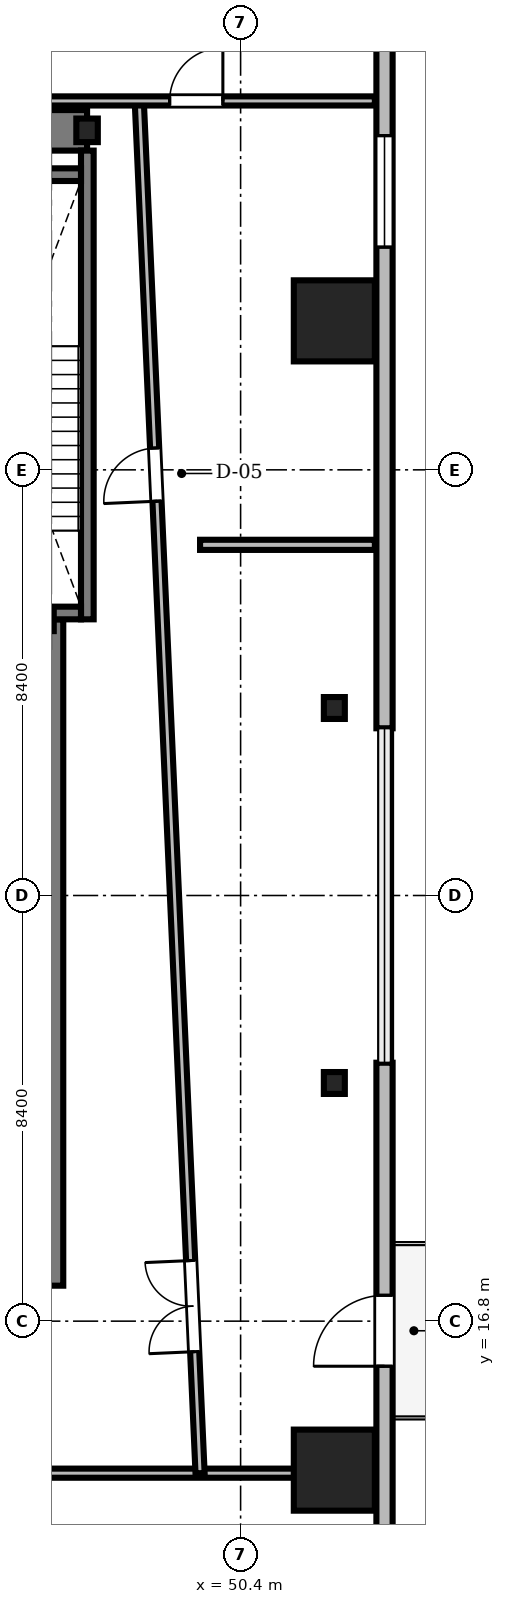
"""IFC4 building model, lengths in metres.
Left out: names, types, materials, properties, quantities, classifications, styles, units other than length and angle.
Written with IfcOpenShell. Run it as: python <this file> out.ifc"""

import sys

from ifc_helpers import new_model, si_unit, direction, frame, frame_2d, origin, origin_2d, place, context, subcontext, project, spatial, rectangle, i_section, extrude, source, transform, mapped, element, fill, save


model = new_model("IFC4")
c1 = context("Model", 3, precision=1e-05, world=origin(), true_north=direction((0.0, 1.0)))
c2 = subcontext(c1, "Body", "Model", "MODEL_VIEW")
j1 = project(units=[si_unit("LENGTHUNIT", "METRE"), si_unit("PLANEANGLEUNIT", "RADIAN")], contexts=[c1])
p1 = place(None, origin())
s1 = spatial("IfcSite", under=j1, at=p1, CompositionType="ELEMENT")
p2 = place(p1, origin())
s2 = spatial("IfcBuilding", under=s1, at=p2, CompositionType="ELEMENT")
p3 = place(p2, frame((0.0, 0.0, 98.7)))
s3 = spatial("IfcBuildingStorey", under=s2, at=p3, CompositionType="ELEMENT", Elevation=98.7)
m1 = source(origin(), c2, "Body", "SweptSolid", [
    extrude(rectangle(XDim=17.52, YDim=0.8, at=frame_2d((8.76, 0.0))), origin(), (0.0, 0.0, 1.0), 4.76),
])
p4 = place(p3, frame((29.85, 40.3, 0.0), z_axis=(0.0, 0.0, 1.0), x_axis=(1.0, 0.0, 0.0)))
e1 = element("IfcWall", 1, at=p4, inside=s3, PredefinedType="SHEAR", context=c2, shape_type="MappedRepresentation", body=[
    mapped(m1, transform((0.0, 0.0, 0.0), scale=1.0)),
])
m2 = source(origin(), c2, "Body", "SweptSolid", [
    extrude(rectangle(XDim=13.15, YDim=0.8, at=frame_2d((6.575, 0.0))), origin(), (0.0, 0.0, 1.0), 4.76),
])
p5 = place(p3, frame((46.5, 17.5, 0.0), z_axis=(0.0, 0.0, 1.0), x_axis=(0.0, 1.0, 0.0)))
e2 = element("IfcWall", 2, at=p5, inside=s3, PredefinedType="SHEAR", context=c2, shape_type="MappedRepresentation", body=[
    mapped(m2, transform((0.0, 0.0, 0.0), scale=1.0)),
])
m3 = source(origin(), c2, "Body", "SweptSolid", [
    extrude(i_section(OverallWidth=0.424, OverallDepth=0.465, WebThickness=0.035, FlangeThickness=0.056, FilletRadius=0.015, at=origin_2d()), origin(), (0.0, 0.0, 1.0), 4.76),
])
for number, where, z_axis, x_axis in (
    (3, (46.5, 30.65, 0.0), (0.0, 0.0, 1.0), (1.0, 0.0, 0.0)),
    (4, (47.37, 40.3, 0.0), (0.0, 0.0, 1.0), (1.0, 0.0, 0.0)),
):
    element("IfcColumn", number, at=place(p3, frame(where, z_axis=z_axis, x_axis=x_axis)), inside=s3, PredefinedType="COLUMN", context=c2, shape_type="MappedRepresentation", body=[
        mapped(m3, transform((0.0, 0.0, 0.0), scale=1.0)),
    ])
m4 = source(origin(), c2, "Body", "SweptSolid", [
    extrude(rectangle(XDim=1.6, YDim=1.6, at=origin_2d()), origin(), (0.0, 0.0, 1.0), 4.76),
])
for number, where, z_axis, x_axis in (
    (5, (52.25, 13.86, 0.0), (0.0, 0.0, 1.0), (1.0, 0.0, 0.0)),
    (6, (52.25, 36.54, 0.0), (0.0, 0.0, 1.0), (1.0, 0.0, 0.0)),
):
    element("IfcColumn", number, at=place(p3, frame(where, z_axis=z_axis, x_axis=x_axis)), inside=s3, PredefinedType="COLUMN", context=c2, shape_type="MappedRepresentation", body=[
        mapped(m4, transform((0.0, 0.0, 0.0), scale=1.0)),
    ])
m5 = source(origin(), c2, "Body", "SweptSolid", [
    extrude(i_section(OverallWidth=0.414, OverallDepth=0.432, WebThickness=0.026, FlangeThickness=0.04, FilletRadius=0.015, at=origin_2d()), origin(), (0.0, 0.0, 1.0), 4.76),
])
for number, where, z_axis, x_axis in (
    (7, (52.25, 21.5, 0.0), (0.0, 0.0, 1.0), (1.0, 0.0, 0.0)),
    (8, (52.25, 28.9, 0.0), (0.0, 0.0, 1.0), (1.0, 0.0, 0.0)),
):
    element("IfcColumn", number, at=place(p3, frame(where, z_axis=z_axis, x_axis=x_axis)), inside=s3, PredefinedType="COLUMN", context=c2, shape_type="MappedRepresentation", body=[
        mapped(m5, transform((0.0, 0.0, 0.0), scale=1.0)),
    ])
m6 = source(origin(), c2, "Body", "SweptSolid", [
    extrude(rectangle(XDim=15.6, YDim=0.32, at=frame_2d((7.8, 0.0))), origin(), (0.0, 0.0, 1.0), 4.76),
])
p6 = place(p3, frame((53.24, 6.3, 0.0), z_axis=(0.0, 0.0, 1.0), x_axis=(0.0, 1.0, 0.0)))
e9 = element("IfcWall", 9, at=p6, inside=s3, PredefinedType="SOLIDWALL", context=c2, shape_type="MappedRepresentation", body=[
    mapped(m6, transform((0.0, 0.0, 0.0), scale=1.0)),
])
m7 = source(origin(), c2, "Body", "SweptSolid", [
    extrude(rectangle(XDim=1.4, YDim=2.3, at=frame_2d((0.7, 1.15))), frame((0.0, 0.17, 0.0), z_axis=(0.0, -1.0, 0.0), x_axis=(1.0, 0.0, 0.0)), (0.0, 0.0, 1.0), 0.34),
])
p7 = place(p6, frame((9.61, 0.0, 0.0)))
e10 = element("IfcOpeningElement", 10, at=p7, cuts=e9, PredefinedType="OPENING", context=c2, shape_type="MappedRepresentation", body=[
    mapped(m7, transform((0.0, 0.0, 0.0), scale=1.0)),
])
m8 = source(origin(), c2, "Body", "SweptSolid", [
    extrude(rectangle(XDim=2.2, YDim=2.4, at=frame_2d((1.1, 1.2))), frame((0.0, 0.17, 0.0), z_axis=(0.0, -1.0, 0.0), x_axis=(1.0, 0.0, 0.0)), (0.0, 0.0, 1.0), 0.34),
])
p8 = place(p6, frame((3.005, 0.0, 0.72)))
e11 = element("IfcOpeningElement", 11, at=p8, cuts=e9, PredefinedType="OPENING", context=c2, shape_type="MappedRepresentation", body=[
    mapped(m8, transform((0.0, 0.0, 0.0), scale=1.0)),
])
m9 = source(origin(), c2, "Body", "SweptSolid", [
    extrude(rectangle(XDim=15.6, YDim=0.32, at=frame_2d((7.8, 0.0))), origin(), (0.0, 0.0, 1.0), 4.76),
])
p9 = place(p3, frame((53.24, 28.5, 0.0), z_axis=(0.0, 0.0, 1.0), x_axis=(0.0, 1.0, 0.0)))
e12 = element("IfcWall", 12, at=p9, inside=s3, PredefinedType="SOLIDWALL", context=c2, shape_type="MappedRepresentation", body=[
    mapped(m9, transform((0.0, 0.0, 0.0), scale=1.0)),
])
p10 = place(p9, frame((9.495, 0.0, 0.72)))
e13 = element("IfcOpeningElement", 13, at=p10, cuts=e12, PredefinedType="OPENING", context=c2, shape_type="MappedRepresentation", body=[
    mapped(m8, transform((0.0, 0.0, 0.0), scale=1.0)),
])
m10 = source(origin(), c2, "Body", "SweptSolid", [
    extrude(rectangle(XDim=9.25, YDim=0.25, at=frame_2d((4.625, 0.0))), origin(), (0.0, 0.0, 1.0), 4.8),
])
p11 = place(p3, frame((47.375, 30.65, 0.0), z_axis=(0.0, 0.0, 1.0), x_axis=(0.0, 1.0, 0.0)))
e14 = element("IfcWall", 14, at=p11, inside=s3, PredefinedType="SOLIDWALL", context=c2, shape_type="MappedRepresentation", body=[
    mapped(m10, transform((0.0, 0.0, 0.0), scale=1.0)),
])
m11 = source(origin(), c2, "Body", "SweptSolid", [
    extrude(rectangle(XDim=3.15, YDim=0.25, at=frame_2d((1.575, 0.0))), origin(), (0.0, 0.0, 1.0), 4.8),
])
p12 = place(p3, frame((44.1, 39.425, 0.0), z_axis=(0.0, 0.0, 1.0), x_axis=(1.0, 0.0, 0.0)))
e15 = element("IfcWall", 15, at=p12, inside=s3, PredefinedType="SOLIDWALL", context=c2, shape_type="MappedRepresentation", body=[
    mapped(m11, transform((0.0, 0.0, 0.0), scale=1.0)),
])
p13 = place(p3, frame((44.1, 30.775, 0.0), z_axis=(0.0, 0.0, 1.0), x_axis=(1.0, 0.0, 0.0)))
e16 = element("IfcWall", 16, at=p13, inside=s3, PredefinedType="SOLIDWALL", context=c2, shape_type="MappedRepresentation", body=[
    mapped(m11, transform((0.0, 0.0, 0.0), scale=1.0)),
])
m12 = source(origin(), c2, "Body", "SweptSolid", [
    extrude(rectangle(XDim=1.1, YDim=2.2, at=frame_2d((0.55, 1.1))), frame((0.0, 0.135, 0.0), z_axis=(0.0, -1.0, 0.0), x_axis=(1.0, 0.0, 0.0)), (0.0, 0.0, 1.0), 0.27),
])
p14 = place(p13, frame((0.35, 0.0, 0.0)))
e17 = element("IfcOpeningElement", 17, at=p14, cuts=e16, PredefinedType="OPENING", context=c2, shape_type="MappedRepresentation", body=[
    mapped(m12, transform((0.0, 0.0, 0.0), scale=1.0)),
])
m13 = source(origin(), c2, "Body", "SweptSolid", [
    extrude(rectangle(XDim=46.1, YDim=0.18, at=frame_2d((23.05, 0.0))), origin(), (0.0, 0.0, 1.0), 4.002),
])
p15 = place(p3, frame((6.95, 13.8, 0.0), z_axis=(0.0, 0.0, 1.0), x_axis=(1.0, 0.0, 0.0)))
e18 = element("IfcWall", 18, at=p15, inside=s3, PredefinedType="PARTITIONING", context=c2, shape_type="MappedRepresentation", body=[
    mapped(m13, transform((0.0, 0.0, 0.0), scale=1.0)),
])
m14 = source(origin(), c2, "Body", "SweptSolid", [
    extrude(rectangle(XDim=1.8, YDim=2.4, at=frame_2d((0.9, 1.2))), frame((0.0, 0.1, 0.0), z_axis=(0.0, -1.0, 0.0), x_axis=(1.0, 0.0, 0.0)), (0.0, 0.0, 1.0), 0.2),
])
p16 = place(p15, frame((20.65, 0.0, 0.0)))
e19 = element("IfcOpeningElement", 19, at=p16, cuts=e18, PredefinedType="OPENING", context=c2, shape_type="MappedRepresentation", body=[
    mapped(m14, transform((0.0, 0.0, 0.0), scale=1.0)),
])
p17 = place(p15, frame((35.25, 0.0, 0.0)))
e20 = element("IfcOpeningElement", 20, at=p17, cuts=e18, PredefinedType="OPENING", context=c2, shape_type="MappedRepresentation", body=[
    mapped(m14, transform((0.0, 0.0, 0.0), scale=1.0)),
])
m15 = source(origin(), c2, "Body", "SweptSolid", [
    extrude(rectangle(XDim=27.106, YDim=0.18, at=frame_2d((13.553, 0.0))), origin(), (0.0, 0.0, 1.0), 4.152),
])
p18 = place(p3, frame((49.6, 13.8, 0.0), z_axis=(0.0, 0.0, 1.0), x_axis=(-0.044277164483, 0.999019285452, 0.0)))
e21 = element("IfcWall", 21, at=p18, inside=s3, PredefinedType="PARTITIONING", context=c2, shape_type="MappedRepresentation", body=[
    mapped(m15, transform((0.0, 0.0, 0.0), scale=1.0)),
])
p19 = place(p18, frame((2.4, 0.0, 0.0)))
e22 = element("IfcOpeningElement", 22, at=p19, cuts=e21, PredefinedType="OPENING", context=c2, shape_type="MappedRepresentation", body=[
    mapped(m14, transform((0.0, 0.0, 0.0), scale=1.0)),
])
m16 = source(origin(), c2, "Body", "SweptSolid", [
    extrude(rectangle(XDim=1.05, YDim=2.2, at=frame_2d((0.525, 1.1))), frame((0.0, 0.1, 0.0), z_axis=(0.0, -1.0, 0.0), x_axis=(1.0, 0.0, 0.0)), (0.0, 0.0, 1.0), 0.2),
])
p20 = place(p18, frame((19.2, 0.0, 0.0)))
e23 = element("IfcOpeningElement", 23, at=p20, cuts=e21, PredefinedType="OPENING", context=c2, shape_type="MappedRepresentation", body=[
    mapped(m16, transform((0.0, 0.0, 0.0), scale=1.0)),
])
m17 = source(origin(), c2, "Body", "SweptSolid", [
    extrude(rectangle(XDim=24.3, YDim=0.18, at=frame_2d((12.15, 0.0))), origin(), (0.0, 0.0, 1.0), 4.002),
])
p21 = place(p3, frame((28.75, 40.88, 0.0), z_axis=(0.0, 0.0, 1.0), x_axis=(1.0, 0.0, 0.0)))
e24 = element("IfcWall", 24, at=p21, inside=s3, PredefinedType="PARTITIONING", context=c2, shape_type="MappedRepresentation", body=[
    mapped(m17, transform((0.0, 0.0, 0.0), scale=1.0)),
])
p22 = place(p21, frame((20.25, 0.0, 0.0)))
e25 = element("IfcOpeningElement", 25, at=p22, cuts=e24, PredefinedType="OPENING", context=c2, shape_type="MappedRepresentation", body=[
    mapped(m16, transform((0.0, 0.0, 0.0), scale=1.0)),
])
m18 = source(origin(), c2, "Body", "SweptSolid", [
    extrude(rectangle(XDim=3.45, YDim=0.2, at=frame_2d((1.725, 0.0))), origin(), (0.0, 0.0, 1.0), 4.002),
])
p23 = place(p3, frame((49.6, 32.12, 0.0), z_axis=(0.0, 0.0, 1.0), x_axis=(1.0, 0.0, 0.0)))
e26 = element("IfcWall", 26, at=p23, inside=s3, PredefinedType="PARTITIONING", context=c2, shape_type="MappedRepresentation", body=[
    mapped(m18, transform((0.0, 0.0, 0.0), scale=1.0)),
])
m19 = source(origin(), c2, "Body", "SweptSolid", [
    extrude(rectangle(XDim=1.4, YDim=2.3, at=frame_2d((0.7, 1.15))), frame((0.0, 0.025, 0.0), z_axis=(0.0, -1.0, 0.0), x_axis=(1.0, 0.0, 0.0)), (0.0, 0.0, 1.0), 0.05),
])
p24 = place(p7, frame((1.4, 0.0, 0.0), z_axis=(0.0, 0.0, 1.0), x_axis=(-1.0, 0.0, 0.0)))
e27 = element("IfcDoor", 27, at=p24, inside=s3, OperationType="DOUBLE_DOOR_SLIDING", PredefinedType="DOOR", context=c2, shape_type="MappedRepresentation", body=[
    mapped(m19, transform((0.0, 0.0, 0.0), scale=1.0)),
])
fill(e10, e27)
m20 = source(origin(), c2, "Body", "SweptSolid", [
    extrude(rectangle(XDim=2.2, YDim=2.4, at=frame_2d((1.1, 1.2))), frame((0.0, 0.03, 0.0), z_axis=(0.0, -1.0, 0.0), x_axis=(1.0, 0.0, 0.0)), (0.0, 0.0, 1.0), 0.06),
])
p25 = place(p10, origin())
e28 = element("IfcWindow", 28, at=p25, inside=s3, PartitioningType="SINGLE_PANEL", PredefinedType="WINDOW", context=c2, shape_type="MappedRepresentation", body=[
    mapped(m20, transform((0.0, 0.0, 0.0), scale=1.0)),
])
fill(e13, e28)
m21 = source(origin(), c2, "Body", "SweptSolid", [
    extrude(rectangle(XDim=1.8, YDim=2.4, at=frame_2d((0.9, 1.2))), frame((0.0, 0.025, 0.0), z_axis=(0.0, -1.0, 0.0), x_axis=(1.0, 0.0, 0.0)), (0.0, 0.0, 1.0), 0.05),
])
p26 = place(p19, origin())
e29 = element("IfcDoor", 29, at=p26, inside=s3, OperationType="DOUBLE_DOOR_SINGLE_SWING", PredefinedType="DOOR", context=c2, shape_type="MappedRepresentation", body=[
    mapped(m21, transform((0.0, 0.0, 0.0), scale=1.0)),
])
fill(e22, e29)
m22 = source(origin(), c2, "Body", "SweptSolid", [
    extrude(rectangle(XDim=1.05, YDim=2.2, at=frame_2d((0.525, 1.1))), frame((0.0, 0.025, 0.0), z_axis=(0.0, -1.0, 0.0), x_axis=(1.0, 0.0, 0.0)), (0.0, 0.0, 1.0), 0.05),
])
p27 = place(p20, origin())
e30 = element("IfcDoor", 30, at=p27, inside=s3, OperationType="SINGLE_SWING_LEFT", PredefinedType="DOOR", context=c2, shape_type="MappedRepresentation", body=[
    mapped(m22, transform((0.0, 0.0, 0.0), scale=1.0)),
])
fill(e23, e30)
p28 = place(p22, origin())
e31 = element("IfcDoor", 31, at=p28, inside=s3, OperationType="SINGLE_SWING_RIGHT", PredefinedType="DOOR", context=c2, shape_type="MappedRepresentation", body=[
    mapped(m22, transform((0.0, 0.0, 0.0), scale=1.0)),
])
fill(e25, e31)
save(model, sys.argv[1])
